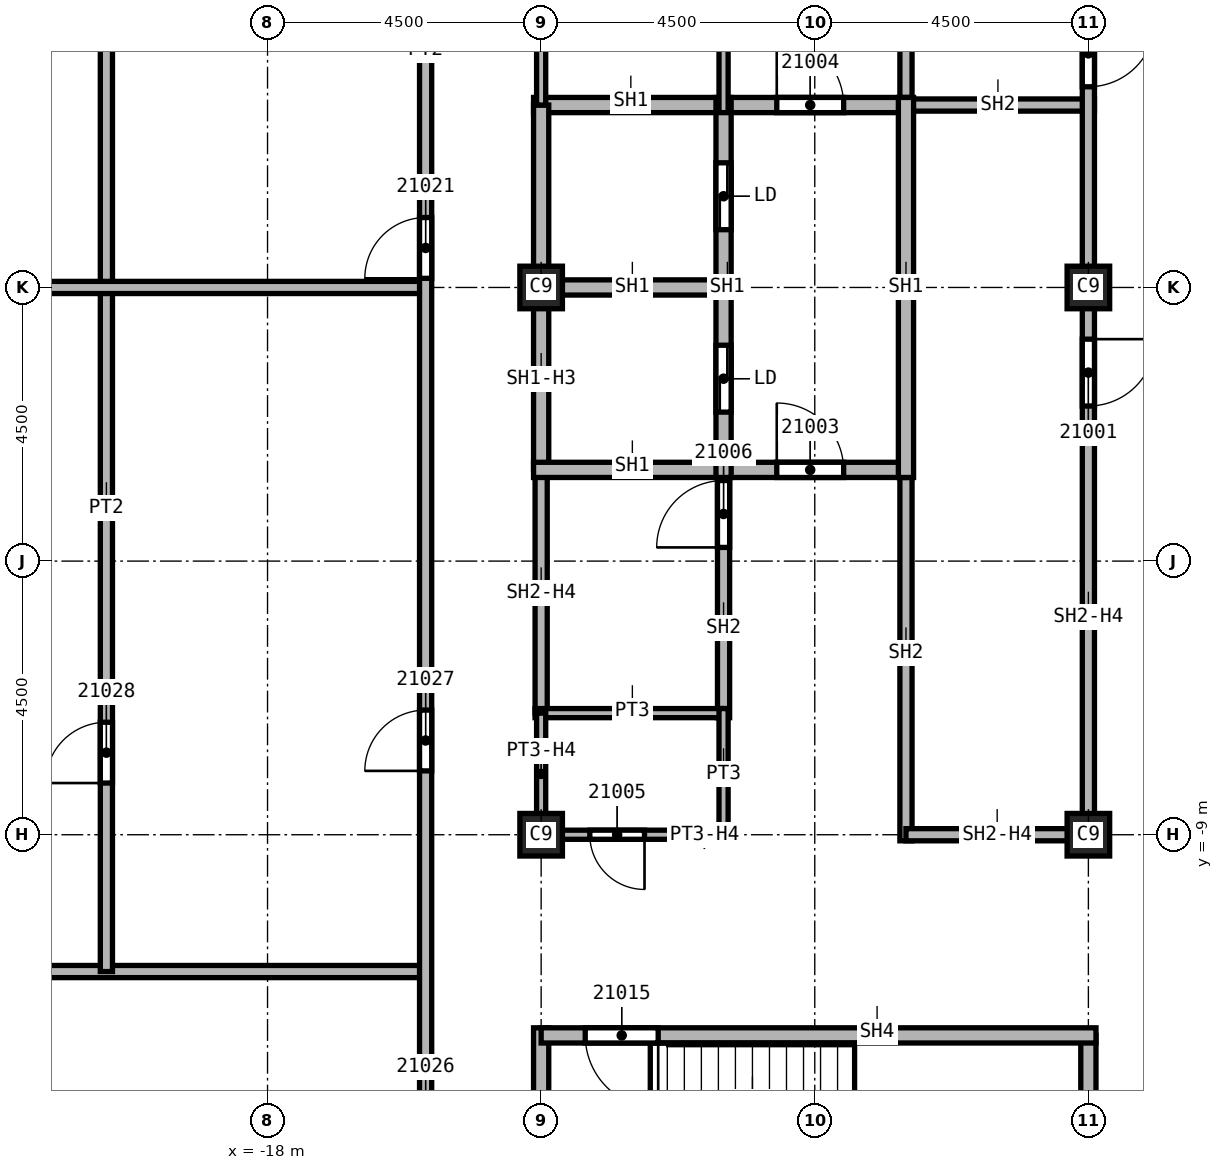
"""IFC4 building model, lengths in metres.
Left out: names, types, materials, properties, quantities, classifications, styles, units other than length and angle.
Written with IfcOpenShell. Run it as: python <this file> out.ifc"""

import sys

from ifc_helpers import new_model, si_unit, direction, frame, frame_2d, origin, origin_2d, place, context, subcontext, project, spatial, rectangle, extrude, element, fill, save


model = new_model("IFC4")
c1 = context("Model", 3, precision=1e-05, world=origin(), true_north=direction((0.0, 1.0)))
c2 = subcontext(c1, "Body", "Model", "MODEL_VIEW")
j1 = project(units=[si_unit("LENGTHUNIT", "METRE"), si_unit("PLANEANGLEUNIT", "RADIAN")], contexts=[c1])
p1 = place(None, origin())
s1 = spatial("IfcSite", under=j1, at=p1, CompositionType="ELEMENT")
p2 = place(p1, origin())
s2 = spatial("IfcBuilding", under=s1, at=p2, CompositionType="ELEMENT")
p3 = place(p2, frame((0.0, 0.0, 308.0)))
s3 = spatial("IfcBuildingStorey", under=s2, at=p3, CompositionType="ELEMENT", Elevation=308.0)
for number, where, z_axis, x_axis in (
    (1, (-4.5, 0.0, 0.0), (0.0, 0.0, 1.0), (1.0, 0.0, 0.0)),
    (2, (-4.5, -9.0, 0.0), (0.0, 0.0, 1.0), (1.0, 0.0, 0.0)),
    (3, (-13.5, 0.0, 0.0), (0.0, 0.0, 1.0), (1.0, 0.0, 0.0)),
    (4, (-13.5, -9.0, 0.0), (0.0, 0.0, 1.0), (1.0, 0.0, 0.0)),
):
    element("IfcColumn", number, at=place(p3, frame(where, z_axis=z_axis, x_axis=x_axis)), inside=s3, PredefinedType="COLUMN", context=c2, shape_type="SweptSolid", body=[
        extrude(rectangle(XDim=0.7, YDim=0.7, at=origin_2d()), origin(), (0.0, 0.0, 1.0), 3.74),
    ])
p4 = place(p3, frame((-26.55, -11.25, 0.0), z_axis=(0.0, 0.0, 1.0), x_axis=(1.0, 0.0, 0.0)))
e5 = element("IfcWall", 5, at=p4, inside=s3, PredefinedType="PARTITIONING", context=c2, shape_type="SweptSolid", body=[
    extrude(rectangle(XDim=11.15, YDim=0.2, at=frame_2d((5.575, 0.0))), origin(), (0.0, 0.0, 1.0), 3.74),
])
p5 = place(p3, frame((-20.65, -11.25, 0.0), z_axis=(0.0, 0.0, 1.0), x_axis=(0.0, 1.0, 0.0)))
e6 = element("IfcWall", 6, at=p5, inside=s3, PredefinedType="PARTITIONING", context=c2, shape_type="SweptSolid", body=[
    extrude(rectangle(XDim=18.1, YDim=0.2, at=frame_2d((9.05, 0.0))), origin(), (0.0, 0.0, 1.0), 3.74),
])
p6 = place(p5, frame((16.8, 0.0, 0.0)))
e7 = element("IfcOpeningElement", 7, at=p6, cuts=e6, PredefinedType="OPENING", context=c2, shape_type="SweptSolid", body=[
    extrude(rectangle(XDim=1.0, YDim=2.1, at=frame_2d((0.5, 1.05))), frame((0.0, 0.1, 0.0), z_axis=(0.0, -1.0, 0.0), x_axis=(1.0, 0.0, 0.0)), (0.0, 0.0, 1.0), 0.2),
])
p7 = place(p5, frame((3.1, 0.0, 0.0)))
e8 = element("IfcOpeningElement", 8, at=p7, cuts=e6, PredefinedType="OPENING", context=c2, shape_type="SweptSolid", body=[
    extrude(rectangle(XDim=1.0, YDim=2.1, at=frame_2d((0.5, 1.05))), frame((0.0, 0.1, 0.0), z_axis=(0.0, -1.0, 0.0), x_axis=(1.0, 0.0, 0.0)), (0.0, 0.0, 1.0), 0.2),
])
p8 = place(p3, frame((-15.4, 0.0, 0.0), z_axis=(0.0, 0.0, 1.0), x_axis=(-1.0, 0.0, 0.0)))
e9 = element("IfcWall", 9, at=p8, inside=s3, PredefinedType="PARTITIONING", context=c2, shape_type="SweptSolid", body=[
    extrude(rectangle(XDim=11.15, YDim=0.2, at=frame_2d((5.575, 0.0))), origin(), (0.0, 0.0, 1.0), 3.74),
])
p9 = place(p3, frame((-15.4, -22.95, 0.0), z_axis=(0.0, 0.0, 1.0), x_axis=(0.0, 1.0, 0.0)))
e10 = element("IfcWall", 10, at=p9, inside=s3, PredefinedType="PARTITIONING", context=c2, shape_type="SweptSolid", body=[
    extrude(rectangle(XDim=36.55, YDim=0.2, at=frame_2d((18.275, 0.0))), origin(), (0.0, 0.0, 1.0), 3.74),
])
p10 = place(p9, frame((23.1, 0.0, 0.0)))
e11 = element("IfcOpeningElement", 11, at=p10, cuts=e10, PredefinedType="OPENING", context=c2, shape_type="SweptSolid", body=[
    extrude(rectangle(XDim=1.0, YDim=2.1, at=frame_2d((0.5, 1.05))), frame((0.0, 0.1, 0.0), z_axis=(0.0, -1.0, 0.0), x_axis=(1.0, 0.0, 0.0)), (0.0, 0.0, 1.0), 0.2),
])
p11 = place(p9, frame((34.35, 0.0, 0.0)))
e12 = element("IfcOpeningElement", 12, at=p11, cuts=e10, PredefinedType="OPENING", context=c2, shape_type="SweptSolid", body=[
    extrude(rectangle(XDim=1.0, YDim=2.1, at=frame_2d((0.5, 1.05))), frame((0.0, 0.1, 0.0), z_axis=(0.0, -1.0, 0.0), x_axis=(1.0, 0.0, 0.0)), (0.0, 0.0, 1.0), 0.2),
])
p12 = place(p9, frame((2.95, 0.0, 0.0)))
e13 = element("IfcOpeningElement", 13, at=p12, cuts=e10, PredefinedType="OPENING", context=c2, shape_type="SweptSolid", body=[
    extrude(rectangle(XDim=1.0, YDim=2.1, at=frame_2d((0.5, 1.05))), frame((0.0, 0.1, 0.0), z_axis=(0.0, -1.0, 0.0), x_axis=(1.0, 0.0, 0.0)), (0.0, 0.0, 1.0), 0.2),
])
p13 = place(p9, frame((6.15, 0.0, 0.0)))
e14 = element("IfcOpeningElement", 14, at=p13, cuts=e10, PredefinedType="OPENING", context=c2, shape_type="SweptSolid", body=[
    extrude(rectangle(XDim=1.0, YDim=2.1, at=frame_2d((0.5, 1.05))), frame((0.0, 0.1, 0.0), z_axis=(0.0, -1.0, 0.0), x_axis=(1.0, 0.0, 0.0)), (0.0, 0.0, 1.0), 0.2),
])
p14 = place(p9, frame((8.625, 0.0, 0.0)))
e15 = element("IfcOpeningElement", 15, at=p14, cuts=e10, PredefinedType="OPENING", context=c2, shape_type="SweptSolid", body=[
    extrude(rectangle(XDim=1.0, YDim=2.1, at=frame_2d((0.5, 1.05))), frame((0.0, 0.1, 0.0), z_axis=(0.0, -1.0, 0.0), x_axis=(1.0, 0.0, 0.0)), (0.0, 0.0, 1.0), 0.2),
])
p15 = place(p9, frame((15.0, 0.0, 0.0)))
e16 = element("IfcOpeningElement", 16, at=p15, cuts=e10, PredefinedType="OPENING", context=c2, shape_type="SweptSolid", body=[
    extrude(rectangle(XDim=1.0, YDim=2.1, at=frame_2d((0.5, 1.05))), frame((0.0, 0.1, 0.0), z_axis=(0.0, -1.0, 0.0), x_axis=(1.0, 0.0, 0.0)), (0.0, 0.0, 1.0), 0.2),
])
p16 = place(p3, frame((-13.5, -7.0, 0.0), z_axis=(0.0, 0.0, 1.0), x_axis=(0.0, 1.0, 0.0)))
e17 = element("IfcWall", 17, at=p16, inside=s3, PredefinedType="SOLIDWALL", context=c2, shape_type="SweptSolid", body=[
    extrude(rectangle(XDim=4.0, YDim=0.2, at=frame_2d((2.0, 0.0))), origin(), (0.0, 0.0, 1.0), 3.062),
])
p17 = place(p3, frame((-10.5, -7.075, 0.0), z_axis=(0.0, 0.0, 1.0), x_axis=(0.0, 1.0, 0.0)))
e18 = element("IfcWall", 18, at=p17, inside=s3, PredefinedType="SOLIDWALL", context=c2, shape_type="SweptSolid", body=[
    extrude(rectangle(XDim=4.2, YDim=0.2, at=frame_2d((2.1, 0.0))), origin(), (0.0, 0.0, 1.0), 3.74),
])
p18 = place(p17, frame((2.8, 0.0, 0.0)))
e19 = element("IfcOpeningElement", 19, at=p18, cuts=e18, PredefinedType="OPENING", context=c2, shape_type="SweptSolid", body=[
    extrude(rectangle(XDim=1.1, YDim=2.1, at=frame_2d((0.55, 1.05))), frame((0.0, 0.1, 0.0), z_axis=(0.0, -1.0, 0.0), x_axis=(1.0, 0.0, 0.0)), (0.0, 0.0, 1.0), 0.2),
])
p19 = place(p3, frame((-7.625, 3.0, 0.0), z_axis=(0.0, 0.0, 1.0), x_axis=(1.0, 0.0, 0.0)))
e20 = element("IfcWall", 20, at=p19, inside=s3, PredefinedType="SOLIDWALL", context=c2, shape_type="SweptSolid", body=[
    extrude(rectangle(XDim=3.225, YDim=0.2, at=frame_2d((1.613, 0.0))), origin(), (0.0, 0.0, 1.0), 3.74),
])
p20 = place(p3, frame((-7.5, -9.1, 0.0), z_axis=(0.0, 0.0, 1.0), x_axis=(0.0, 1.0, 0.0)))
e21 = element("IfcWall", 21, at=p20, inside=s3, PredefinedType="SOLIDWALL", context=c2, shape_type="SweptSolid", body=[
    extrude(rectangle(XDim=6.225, YDim=0.2, at=frame_2d((3.113, 0.0))), origin(), (0.0, 0.0, 1.0), 3.74),
])
p21 = place(p3, frame((-7.5, 2.875, 0.0), z_axis=(0.0, 0.0, 1.0), x_axis=(0.0, 1.0, 0.0)))
e22 = element("IfcWall", 22, at=p21, inside=s3, PredefinedType="SOLIDWALL", context=c2, shape_type="SweptSolid", body=[
    extrude(rectangle(XDim=3.125, YDim=0.2, at=frame_2d((1.562, 0.0))), origin(), (0.0, 0.0, 1.0), 3.74),
])
p22 = place(p3, frame((-4.5, -9.0, 0.0), z_axis=(0.0, 0.0, 1.0), x_axis=(-1.0, 0.0, 0.0)))
e23 = element("IfcWall", 23, at=p22, inside=s3, PredefinedType="SOLIDWALL", context=c2, shape_type="SweptSolid", body=[
    extrude(rectangle(XDim=3.0, YDim=0.2, at=frame_2d((1.5, 0.0))), origin(), (0.0, 0.0, 1.0), 3.062),
])
p23 = place(p3, frame((-4.5, 6.0, 0.0), z_axis=(0.0, 0.0, 1.0), x_axis=(0.0, -1.0, 0.0)))
e24 = element("IfcWall", 24, at=p23, inside=s3, PredefinedType="SOLIDWALL", context=c2, shape_type="SweptSolid", body=[
    extrude(rectangle(XDim=15.1, YDim=0.2, at=frame_2d((7.55, 0.0))), origin(), (0.0, 0.0, 1.0), 3.062),
])
p24 = place(p23, frame((6.85, 0.0, 0.0)))
e25 = element("IfcOpeningElement", 25, at=p24, cuts=e24, PredefinedType="OPENING", context=c2, shape_type="SweptSolid", body=[
    extrude(rectangle(XDim=1.1, YDim=2.1, at=frame_2d((0.55, 1.05))), frame((0.0, 0.1, 0.0), z_axis=(0.0, -1.0, 0.0), x_axis=(1.0, 0.0, 0.0)), (0.0, 0.0, 1.0), 0.2),
])
p25 = place(p23, frame((1.6, 0.0, 0.0)))
e26 = element("IfcOpeningElement", 26, at=p25, cuts=e24, PredefinedType="OPENING", context=c2, shape_type="SweptSolid", body=[
    extrude(rectangle(XDim=1.1, YDim=2.1, at=frame_2d((0.55, 1.05))), frame((0.0, 0.1, 0.0), z_axis=(0.0, -1.0, 0.0), x_axis=(1.0, 0.0, 0.0)), (0.0, 0.0, 1.0), 0.2),
])
p26 = place(p3, frame((-13.625, 0.0, 0.0), z_axis=(0.0, 0.0, 1.0), x_axis=(1.0, 0.0, 0.0)))
e27 = element("IfcWall", 27, at=p26, inside=s3, PredefinedType="SOLIDWALL", context=c2, shape_type="SweptSolid", body=[
    extrude(rectangle(XDim=3.125, YDim=0.25, at=frame_2d((1.562, 0.0))), origin(), (0.0, 0.0, 1.0), 3.74),
])
p27 = place(p3, frame((-13.625, 3.0, 0.0), z_axis=(0.0, 0.0, 1.0), x_axis=(1.0, 0.0, 0.0)))
e28 = element("IfcWall", 28, at=p27, inside=s3, PredefinedType="SOLIDWALL", context=c2, shape_type="SweptSolid", body=[
    extrude(rectangle(XDim=6.125, YDim=0.25, at=frame_2d((3.062, 0.0))), origin(), (0.0, 0.0, 1.0), 3.74),
])
p28 = place(p27, frame((4.0, 0.0, 0.0)))
e29 = element("IfcOpeningElement", 29, at=p28, cuts=e28, PredefinedType="OPENING", context=c2, shape_type="SweptSolid", body=[
    extrude(rectangle(XDim=1.1, YDim=2.1, at=frame_2d((0.55, 1.05))), frame((0.0, 0.125, 0.0), z_axis=(0.0, -1.0, 0.0), x_axis=(1.0, 0.0, 0.0)), (0.0, 0.0, 1.0), 0.25),
])
p29 = place(p3, frame((-13.5, -3.0, 0.0), z_axis=(0.0, 0.0, 1.0), x_axis=(0.0, 1.0, 0.0)))
e30 = element("IfcWall", 30, at=p29, inside=s3, PredefinedType="SOLIDWALL", context=c2, shape_type="SweptSolid", body=[
    extrude(rectangle(XDim=6.0, YDim=0.25, at=frame_2d((3.0, 0.0))), origin(), (0.0, 0.0, 1.0), 3.062),
])
p30 = place(p3, frame((-13.625, -3.0, 0.0), z_axis=(0.0, 0.0, 1.0), x_axis=(1.0, 0.0, 0.0)))
e31 = element("IfcWall", 31, at=p30, inside=s3, PredefinedType="SOLIDWALL", context=c2, shape_type="SweptSolid", body=[
    extrude(rectangle(XDim=6.125, YDim=0.25, at=frame_2d((3.062, 0.0))), origin(), (0.0, 0.0, 1.0), 3.74),
])
p31 = place(p30, frame((4.0, 0.0, 0.0)))
e32 = element("IfcOpeningElement", 32, at=p31, cuts=e31, PredefinedType="OPENING", context=c2, shape_type="SweptSolid", body=[
    extrude(rectangle(XDim=1.1, YDim=2.1, at=frame_2d((0.55, 1.05))), frame((0.0, 0.125, 0.0), z_axis=(0.0, -1.0, 0.0), x_axis=(1.0, 0.0, 0.0)), (0.0, 0.0, 1.0), 0.25),
])
p32 = place(p3, frame((-10.5, -3.125, 0.0), z_axis=(0.0, 0.0, 1.0), x_axis=(0.0, 1.0, 0.0)))
e33 = element("IfcWall", 33, at=p32, inside=s3, PredefinedType="SOLIDWALL", context=c2, shape_type="SweptSolid", body=[
    extrude(rectangle(XDim=6.25, YDim=0.25, at=frame_2d((3.125, 0.0))), origin(), (0.0, 0.0, 1.0), 3.74),
])
p33 = place(p32, frame((1.075, 0.0, 0.0)))
e34 = element("IfcOpeningElement", 34, at=p33, cuts=e33, PredefinedType="OPENING", context=c2, shape_type="SweptSolid", body=[
    extrude(rectangle(XDim=1.1, YDim=2.1, at=frame_2d((0.55, 1.05))), frame((0.0, 0.125, 0.0), z_axis=(0.0, -1.0, 0.0), x_axis=(1.0, 0.0, 0.0)), (0.0, 0.0, 1.0), 0.25),
])
p34 = place(p32, frame((4.075, 0.0, 0.0)))
e35 = element("IfcOpeningElement", 35, at=p34, cuts=e33, PredefinedType="OPENING", context=c2, shape_type="SweptSolid", body=[
    extrude(rectangle(XDim=1.1, YDim=2.1, at=frame_2d((0.55, 1.05))), frame((0.0, 0.125, 0.0), z_axis=(0.0, -1.0, 0.0), x_axis=(1.0, 0.0, 0.0)), (0.0, 0.0, 1.0), 0.25),
])
p35 = place(p3, frame((-7.5, -3.125, 0.0), z_axis=(0.0, 0.0, 1.0), x_axis=(0.0, 1.0, 0.0)))
e36 = element("IfcWall", 36, at=p35, inside=s3, PredefinedType="SOLIDWALL", context=c2, shape_type="SweptSolid", body=[
    extrude(rectangle(XDim=6.25, YDim=0.25, at=frame_2d((3.125, 0.0))), origin(), (0.0, 0.0, 1.0), 3.74),
])
p36 = place(p3, frame((-13.5, -12.175, 0.0), z_axis=(0.0, 0.0, 1.0), x_axis=(0.0, -1.0, 0.0)))
e37 = element("IfcWall", 37, at=p36, inside=s3, PredefinedType="SOLIDWALL", context=c2, shape_type="SweptSolid", body=[
    extrude(rectangle(XDim=4.75, YDim=0.25, at=frame_2d((2.375, 0.0))), origin(), (0.0, 0.0, 1.0), 3.74),
])
p37 = place(p3, frame((-4.5, -12.3, 0.0), z_axis=(0.0, 0.0, 1.0), x_axis=(0.0, -1.0, 0.0)))
e38 = element("IfcWall", 38, at=p37, inside=s3, PredefinedType="SOLIDWALL", context=c2, shape_type="SweptSolid", body=[
    extrude(rectangle(XDim=4.625, YDim=0.25, at=frame_2d((2.312, 0.0))), origin(), (0.0, 0.0, 1.0), 3.74),
])
p38 = place(p3, frame((-4.375, -12.3, 0.0), z_axis=(0.0, 0.0, 1.0), x_axis=(-1.0, 0.0, 0.0)))
e39 = element("IfcWall", 39, at=p38, inside=s3, PredefinedType="SOLIDWALL", context=c2, shape_type="SweptSolid", body=[
    extrude(rectangle(XDim=9.125, YDim=0.25, at=frame_2d((4.562, 0.0))), origin(), (0.0, 0.0, 1.0), 3.74),
])
p39 = place(p38, frame((7.2, 0.0, 0.0)))
e40 = element("IfcOpeningElement", 40, at=p39, cuts=e39, PredefinedType="OPENING", context=c2, shape_type="SweptSolid", body=[
    extrude(rectangle(XDim=1.2, YDim=2.1, at=frame_2d((0.6, 1.05))), frame((0.0, 0.125, 0.0), z_axis=(0.0, -1.0, 0.0), x_axis=(1.0, 0.0, 0.0)), (0.0, 0.0, 1.0), 0.25),
])
p40 = place(p3, frame((-13.6, -7.0, 0.0), z_axis=(0.0, 0.0, 1.0), x_axis=(1.0, 0.0, 0.0)))
e41 = element("IfcWall", 41, at=p40, inside=s3, PredefinedType="PARTITIONING", context=c2, shape_type="SweptSolid", body=[
    extrude(rectangle(XDim=3.1, YDim=0.15, at=frame_2d((1.55, 0.0))), origin(), (0.0, 0.0, 1.0), 3.74),
])
p41 = place(p3, frame((-13.5, -9.075, 0.0), z_axis=(0.0, 0.0, 1.0), x_axis=(0.0, 1.0, 0.0)))
e42 = element("IfcWall", 42, at=p41, inside=s3, PredefinedType="PARTITIONING", context=c2, shape_type="SweptSolid", body=[
    extrude(rectangle(XDim=2.075, YDim=0.15, at=frame_2d((1.038, 0.0))), origin(), (0.0, 0.0, 1.0), 3.062),
])
p42 = place(p3, frame((-13.5, 3.0, 0.0), z_axis=(0.0, 0.0, 1.0), x_axis=(0.0, 1.0, 0.0)))
e43 = element("IfcWall", 43, at=p42, inside=s3, PredefinedType="PARTITIONING", context=c2, shape_type="SweptSolid", body=[
    extrude(rectangle(XDim=6.075, YDim=0.15, at=frame_2d((3.038, 0.0))), origin(), (0.0, 0.0, 1.0), 3.062),
])
p43 = place(p3, frame((-10.5, -9.075, 0.0), z_axis=(0.0, 0.0, 1.0), x_axis=(0.0, 1.0, 0.0)))
e44 = element("IfcWall", 44, at=p43, inside=s3, PredefinedType="PARTITIONING", context=c2, shape_type="SweptSolid", body=[
    extrude(rectangle(XDim=2.15, YDim=0.15, at=frame_2d((1.075, 0.0))), origin(), (0.0, 0.0, 1.0), 3.74),
])
p44 = place(p3, frame((-10.5, -9.0, 0.0), z_axis=(0.0, 0.0, 1.0), x_axis=(-1.0, 0.0, 0.0)))
e45 = element("IfcWall", 45, at=p44, inside=s3, PredefinedType="PARTITIONING", context=c2, shape_type="SweptSolid", body=[
    extrude(rectangle(XDim=3.0, YDim=0.15, at=frame_2d((1.5, 0.0))), origin(), (0.0, 0.0, 1.0), 3.062),
])
p45 = place(p44, frame((1.3, 0.0, 0.0)))
e46 = element("IfcOpeningElement", 46, at=p45, cuts=e45, PredefinedType="OPENING", context=c2, shape_type="SweptSolid", body=[
    extrude(rectangle(XDim=0.9, YDim=2.1, at=frame_2d((0.45, 1.05))), frame((0.0, 0.075, 0.0), z_axis=(0.0, -1.0, 0.0), x_axis=(1.0, 0.0, 0.0)), (0.0, 0.0, 1.0), 0.15),
])
p46 = place(p3, frame((-10.5, 2.875, 0.0), z_axis=(0.0, 0.0, 1.0), x_axis=(0.0, 1.0, 0.0)))
e47 = element("IfcWall", 47, at=p46, inside=s3, PredefinedType="PARTITIONING", context=c2, shape_type="SweptSolid", body=[
    extrude(rectangle(XDim=6.2, YDim=0.15, at=frame_2d((3.1, 0.0))), origin(), (0.0, 0.0, 1.0), 3.74),
])
p47 = place(p46, frame((3.55, 0.0, 0.0)))
e48 = element("IfcOpeningElement", 48, at=p47, cuts=e47, PredefinedType="OPENING", context=c2, shape_type="SweptSolid", body=[
    extrude(rectangle(XDim=0.9, YDim=2.1, at=frame_2d((0.45, 1.05))), frame((0.0, 0.075, 0.0), z_axis=(0.0, -1.0, 0.0), x_axis=(1.0, 0.0, 0.0)), (0.0, 0.0, 1.0), 0.15),
])
p48 = place(p24, origin())
e49 = element("IfcDoor", 49, at=p48, inside=s3, OperationType="SINGLE_SWING_RIGHT", PredefinedType="DOOR", context=c2, shape_type="SweptSolid", body=[
    extrude(rectangle(XDim=1.1, YDim=2.1, at=frame_2d((0.55, 1.05))), frame((0.0, 0.025, 0.0), z_axis=(0.0, -1.0, 0.0), x_axis=(1.0, 0.0, 0.0)), (0.0, 0.0, 1.0), 0.05),
])
fill(e25, e49)
p49 = place(p25, origin())
e50 = element("IfcDoor", 50, at=p49, inside=s3, OperationType="SINGLE_SWING_LEFT", PredefinedType="DOOR", context=c2, shape_type="SweptSolid", body=[
    extrude(rectangle(XDim=1.1, YDim=2.1, at=frame_2d((0.55, 1.05))), frame((0.0, 0.025, 0.0), z_axis=(0.0, -1.0, 0.0), x_axis=(1.0, 0.0, 0.0)), (0.0, 0.0, 1.0), 0.05),
])
fill(e26, e50)
p50 = place(p31, origin())
e51 = element("IfcDoor", 51, at=p50, inside=s3, OperationType="SINGLE_SWING_RIGHT", PredefinedType="DOOR", context=c2, shape_type="SweptSolid", body=[
    extrude(rectangle(XDim=1.1, YDim=2.1, at=frame_2d((0.55, 1.05))), frame((0.0, 0.025, 0.0), z_axis=(0.0, -1.0, 0.0), x_axis=(1.0, 0.0, 0.0)), (0.0, 0.0, 1.0), 0.05),
])
fill(e32, e51)
p51 = place(p28, origin())
e52 = element("IfcDoor", 52, at=p51, inside=s3, OperationType="SINGLE_SWING_LEFT", PredefinedType="DOOR", context=c2, shape_type="SweptSolid", body=[
    extrude(rectangle(XDim=1.1, YDim=2.1, at=frame_2d((0.55, 1.05))), frame((0.0, 0.025, 0.0), z_axis=(0.0, -1.0, 0.0), x_axis=(1.0, 0.0, 0.0)), (0.0, 0.0, 1.0), 0.05),
])
fill(e29, e52)
p52 = place(p45, origin())
e53 = element("IfcDoor", 53, at=p52, inside=s3, OperationType="SINGLE_SWING_RIGHT", PredefinedType="DOOR", context=c2, shape_type="SweptSolid", body=[
    extrude(rectangle(XDim=0.9, YDim=2.1, at=frame_2d((0.45, 1.05))), frame((0.0, 0.025, 0.0), z_axis=(0.0, -1.0, 0.0), x_axis=(1.0, 0.0, 0.0)), (0.0, 0.0, 1.0), 0.05),
])
fill(e46, e53)
p53 = place(p18, origin())
e54 = element("IfcDoor", 54, at=p53, inside=s3, OperationType="SINGLE_SWING_LEFT", PredefinedType="DOOR", context=c2, shape_type="SweptSolid", body=[
    extrude(rectangle(XDim=1.1, YDim=2.1, at=frame_2d((0.55, 1.05))), frame((0.0, 0.025, 0.0), z_axis=(0.0, -1.0, 0.0), x_axis=(1.0, 0.0, 0.0)), (0.0, 0.0, 1.0), 0.05),
])
fill(e19, e54)
p54 = place(p39, origin())
e55 = element("IfcDoor", 55, at=p54, inside=s3, OperationType="SINGLE_SWING_RIGHT", PredefinedType="DOOR", context=c2, shape_type="SweptSolid", body=[
    extrude(rectangle(XDim=1.2, YDim=2.1, at=frame_2d((0.6, 1.05))), frame((0.0, 0.025, 0.0), z_axis=(0.0, -1.0, 0.0), x_axis=(1.0, 0.0, 0.0)), (0.0, 0.0, 1.0), 0.05),
])
fill(e40, e55)
p55 = place(p10, origin())
e56 = element("IfcDoor", 56, at=p55, inside=s3, OperationType="SINGLE_SWING_RIGHT", PredefinedType="DOOR", context=c2, shape_type="SweptSolid", body=[
    extrude(rectangle(XDim=1.0, YDim=2.1, at=frame_2d((0.5, 1.05))), frame((0.0, 0.025, 0.0), z_axis=(0.0, -1.0, 0.0), x_axis=(1.0, 0.0, 0.0)), (0.0, 0.0, 1.0), 0.05),
])
fill(e11, e56)
p56 = place(p15, origin())
e57 = element("IfcDoor", 57, at=p56, inside=s3, OperationType="SINGLE_SWING_RIGHT", PredefinedType="DOOR", context=c2, shape_type="SweptSolid", body=[
    extrude(rectangle(XDim=1.0, YDim=2.1, at=frame_2d((0.5, 1.05))), frame((0.0, 0.025, 0.0), z_axis=(0.0, -1.0, 0.0), x_axis=(1.0, 0.0, 0.0)), (0.0, 0.0, 1.0), 0.05),
])
fill(e16, e57)
p57 = place(p7, origin())
e58 = element("IfcDoor", 58, at=p57, inside=s3, OperationType="SINGLE_SWING_LEFT", PredefinedType="DOOR", context=c2, shape_type="SweptSolid", body=[
    extrude(rectangle(XDim=1.0, YDim=2.1, at=frame_2d((0.5, 1.05))), frame((0.0, 0.025, 0.0), z_axis=(0.0, -1.0, 0.0), x_axis=(1.0, 0.0, 0.0)), (0.0, 0.0, 1.0), 0.05),
])
fill(e8, e58)
p58 = place(p33, origin())
e59 = element("IfcDoor", 59, at=p58, inside=s3, OperationType="SLIDING_TO_LEFT", PredefinedType="DOOR", context=c2, shape_type="SweptSolid", body=[
    extrude(rectangle(XDim=1.1, YDim=2.1, at=frame_2d((0.55, 1.05))), frame((0.0, 0.025, 0.0), z_axis=(0.0, -1.0, 0.0), x_axis=(1.0, 0.0, 0.0)), (0.0, 0.0, 1.0), 0.05),
])
fill(e34, e59)
p59 = place(p34, origin())
e60 = element("IfcDoor", 60, at=p59, inside=s3, OperationType="SLIDING_TO_LEFT", PredefinedType="DOOR", context=c2, shape_type="SweptSolid", body=[
    extrude(rectangle(XDim=1.1, YDim=2.1, at=frame_2d((0.55, 1.05))), frame((0.0, 0.025, 0.0), z_axis=(0.0, -1.0, 0.0), x_axis=(1.0, 0.0, 0.0)), (0.0, 0.0, 1.0), 0.05),
])
fill(e35, e60)
save(model, sys.argv[1])
